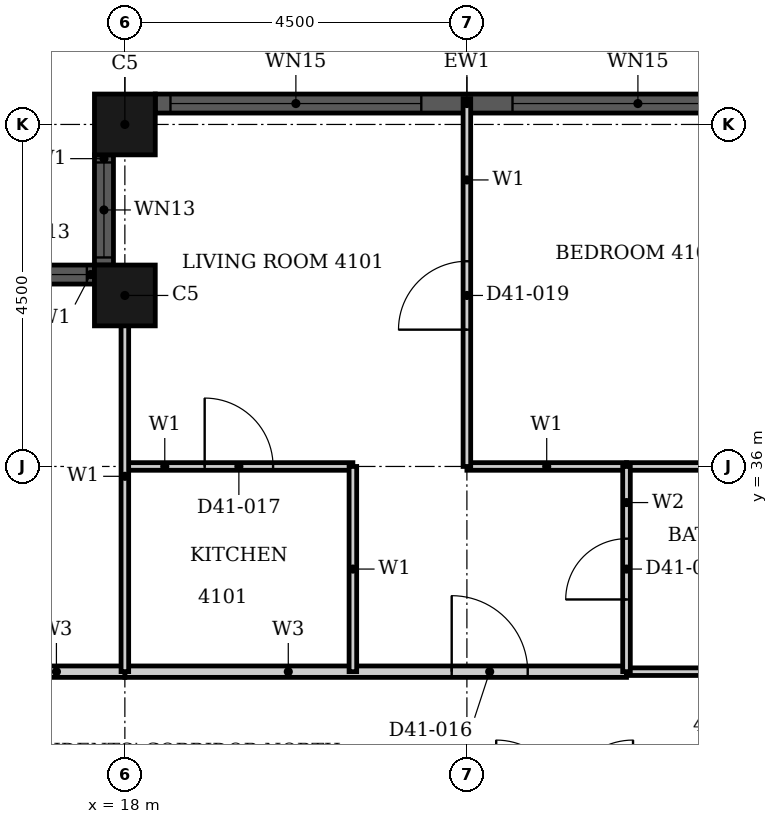
"""IFC4 building model, lengths in metres.
Left out: names, types, materials, properties, quantities, classifications, styles, units other than length and angle.
Written with IfcOpenShell. Run it as: python <this file> out.ifc"""

import sys

from ifc_helpers import new_model, si_unit, direction, frame, frame_2d, origin, origin_2d, place, context, subcontext, project, spatial, rectangle, hollow_rectangle, extrude, element, fill, save


model = new_model("IFC4")
c1 = context("Model", 3, precision=1e-05, world=origin(), true_north=direction((0.0, 1.0)))
c2 = subcontext(c1, "Body", "Model", "MODEL_VIEW")
j1 = project(units=[si_unit("LENGTHUNIT", "METRE"), si_unit("PLANEANGLEUNIT", "RADIAN")], contexts=[c1])
p1 = place(None, origin())
s1 = spatial("IfcSite", under=j1, at=p1, CompositionType="ELEMENT")
p2 = place(p1, origin())
s2 = spatial("IfcBuilding", under=s1, at=p2, CompositionType="ELEMENT")
p3 = place(p2, frame((0.0, 0.0, 165.4)))
s3 = spatial("IfcBuildingStorey", under=s2, at=p3, CompositionType="ELEMENT", Elevation=165.4)
for number, where, z_axis, x_axis in (
    (1, (18.0, 40.5, 0.0), (0.0, 0.0, 1.0), (1.0, 0.0, 0.0)),
    (2, (18.0, 38.25, 0.0), (0.0, 0.0, 1.0), (1.0, 0.0, 0.0)),
):
    element("IfcColumn", number, at=place(p3, frame(where, z_axis=z_axis, x_axis=x_axis)), inside=s3, PredefinedType="COLUMN", context=c2, shape_type="SweptSolid", body=[
        extrude(hollow_rectangle(XDim=0.8, YDim=0.8, WallThickness=0.025, at=origin_2d()), origin(), (0.0, 0.0, 1.0), 3.7),
    ])
p4 = place(p3, frame((26.6, 40.775, 0.0), z_axis=(0.0, 0.0, 1.0), x_axis=(-1.0, 0.0, 0.0)))
e3 = element("IfcWall", 3, at=p4, inside=s3, PredefinedType="SOLIDWALL", context=c2, shape_type="SweptSolid", body=[
    extrude(rectangle(XDim=8.2, YDim=0.25, at=frame_2d((4.1, 0.0))), origin(), (0.0, 0.0, 1.0), 3.7),
])
p5 = place(p4, frame((0.2, 0.0, 0.45)))
e4 = element("IfcOpeningElement", 4, at=p5, cuts=e3, PredefinedType="OPENING", context=c2, shape_type="SweptSolid", body=[
    extrude(rectangle(XDim=3.3, YDim=2.3, at=frame_2d((1.65, 1.15))), frame((0.0, 0.135, 0.0), z_axis=(0.0, -1.0, 0.0), x_axis=(1.0, 0.0, 0.0)), (0.0, 0.0, 1.0), 0.27),
])
p6 = place(p4, frame((4.7, 0.0, 0.45)))
e5 = element("IfcOpeningElement", 5, at=p6, cuts=e3, PredefinedType="OPENING", context=c2, shape_type="SweptSolid", body=[
    extrude(rectangle(XDim=3.3, YDim=2.3, at=frame_2d((1.65, 1.15))), frame((0.0, 0.135, 0.0), z_axis=(0.0, -1.0, 0.0), x_axis=(1.0, 0.0, 0.0)), (0.0, 0.0, 1.0), 0.27),
])
p7 = place(p3, frame((17.725, 40.1, 0.0), z_axis=(0.0, 0.0, 1.0), x_axis=(0.0, -1.0, 0.0)))
e6 = element("IfcWall", 6, at=p7, inside=s3, PredefinedType="SOLIDWALL", context=c2, shape_type="SweptSolid", body=[
    extrude(rectangle(XDim=1.45, YDim=0.25, at=frame_2d((0.725, 0.0))), origin(), (0.0, 0.0, 1.0), 3.7),
])
p8 = place(p7, frame((0.1, 0.0, 0.9)))
e7 = element("IfcOpeningElement", 7, at=p8, cuts=e6, PredefinedType="OPENING", context=c2, shape_type="SweptSolid", body=[
    extrude(rectangle(XDim=1.25, YDim=1.85, at=frame_2d((0.625, 0.925))), frame((0.0, 0.135, 0.0), z_axis=(0.0, -1.0, 0.0), x_axis=(1.0, 0.0, 0.0)), (0.0, 0.0, 1.0), 0.27),
])
p9 = place(p3, frame((17.6, 38.525, 0.0), z_axis=(0.0, 0.0, 1.0), x_axis=(-1.0, 0.0, 0.0)))
e8 = element("IfcWall", 8, at=p9, inside=s3, PredefinedType="SOLIDWALL", context=c2, shape_type="SweptSolid", body=[
    extrude(rectangle(XDim=1.45, YDim=0.25, at=frame_2d((0.725, 0.0))), origin(), (0.0, 0.0, 1.0), 3.7),
])
p10 = place(p9, frame((0.1, 0.0, 0.9)))
e9 = element("IfcOpeningElement", 9, at=p10, cuts=e8, PredefinedType="OPENING", context=c2, shape_type="SweptSolid", body=[
    extrude(rectangle(XDim=1.25, YDim=1.85, at=frame_2d((0.625, 0.925))), frame((0.0, 0.135, 0.0), z_axis=(0.0, -1.0, 0.0), x_axis=(1.0, 0.0, 0.0)), (0.0, 0.0, 1.0), 0.27),
])
p11 = place(p3, frame((18.0, 33.3, 0.0), z_axis=(0.0, 0.0, 1.0), x_axis=(1.0, 0.0, 0.0)))
e10 = element("IfcWall", 10, at=p11, inside=s3, PredefinedType="PARTITIONING", context=c2, shape_type="SweptSolid", body=[
    extrude(rectangle(XDim=6.6, YDim=0.15, at=frame_2d((3.3, 0.0))), origin(), (0.0, 0.0, 1.0), 3.4),
])
p12 = place(p11, frame((4.3, 0.0, 0.0)))
e11 = element("IfcOpeningElement", 11, at=p12, cuts=e10, PredefinedType="OPENING", context=c2, shape_type="SweptSolid", body=[
    extrude(rectangle(XDim=1.0, YDim=2.2, at=frame_2d((0.5, 1.1))), frame((0.0, 0.085, 0.0), z_axis=(0.0, -1.0, 0.0), x_axis=(1.0, 0.0, 0.0)), (0.0, 0.0, 1.0), 0.17),
])
p13 = place(p3, frame((16.2, 33.3, 0.0), z_axis=(0.0, 0.0, 1.0), x_axis=(1.0, 0.0, 0.0)))
e12 = element("IfcWall", 12, at=p13, inside=s3, PredefinedType="PARTITIONING", context=c2, shape_type="SweptSolid", body=[
    extrude(rectangle(XDim=1.799, YDim=0.15, at=frame_2d((0.899, 0.0))), origin(), (0.0, 0.0, 1.0), 3.4),
])
p14 = place(p3, frame((22.5, 36.0, 0.0), z_axis=(0.0, 0.0, 1.0), x_axis=(1.0, 0.0, 0.0)))
e13 = element("IfcWall", 13, at=p14, inside=s3, PredefinedType="PARTITIONING", context=c2, shape_type="SweptSolid", body=[
    extrude(rectangle(XDim=2.1, YDim=0.1, at=frame_2d((1.05, 0.0))), origin(), (0.0, 0.0, 1.0), 3.4),
])
p15 = place(p3, frame((18.0, 36.0, 0.0), z_axis=(0.0, 0.0, 1.0), x_axis=(1.0, 0.0, 0.0)))
e14 = element("IfcWall", 14, at=p15, inside=s3, PredefinedType="PARTITIONING", context=c2, shape_type="SweptSolid", body=[
    extrude(rectangle(XDim=3.0, YDim=0.1, at=frame_2d((1.5, 0.0))), origin(), (0.0, 0.0, 1.0), 3.4),
])
p16 = place(p15, frame((1.05, 0.0, 0.0)))
e15 = element("IfcOpeningElement", 15, at=p16, cuts=e14, PredefinedType="OPENING", context=c2, shape_type="SweptSolid", body=[
    extrude(rectangle(XDim=0.9, YDim=2.1, at=frame_2d((0.45, 1.05))), frame((0.0, 0.06, 0.0), z_axis=(0.0, -1.0, 0.0), x_axis=(1.0, 0.0, 0.0)), (0.0, 0.0, 1.0), 0.12),
])
p17 = place(p3, frame((18.0, 33.301, 0.0), z_axis=(0.0, 0.0, 1.0), x_axis=(0.0, 1.0, 0.0)))
e16 = element("IfcWall", 16, at=p17, inside=s3, PredefinedType="PARTITIONING", context=c2, shape_type="SweptSolid", body=[
    extrude(rectangle(XDim=5.139, YDim=0.1, at=frame_2d((2.569, 0.0))), origin(), (0.0, 0.0, 1.0), 3.4),
])
p18 = place(p3, frame((21.0, 33.3, 0.0), z_axis=(0.0, 0.0, 1.0), x_axis=(0.0, 1.0, 0.0)))
e17 = element("IfcWall", 17, at=p18, inside=s3, PredefinedType="PARTITIONING", context=c2, shape_type="SweptSolid", body=[
    extrude(rectangle(XDim=2.7, YDim=0.1, at=frame_2d((1.35, 0.0))), origin(), (0.0, 0.0, 1.0), 3.4),
])
p19 = place(p3, frame((22.5, 36.0, 0.0), z_axis=(0.0, 0.0, 1.0), x_axis=(0.0, 1.0, 0.0)))
e18 = element("IfcWall", 18, at=p19, inside=s3, PredefinedType="PARTITIONING", context=c2, shape_type="SweptSolid", body=[
    extrude(rectangle(XDim=4.84, YDim=0.1, at=frame_2d((2.42, 0.0))), origin(), (0.0, 0.0, 1.0), 3.4),
])
p20 = place(p19, frame((1.8, 0.0, 0.0)))
e19 = element("IfcOpeningElement", 19, at=p20, cuts=e18, PredefinedType="OPENING", context=c2, shape_type="SweptSolid", body=[
    extrude(rectangle(XDim=0.9, YDim=2.1, at=frame_2d((0.45, 1.05))), frame((0.0, 0.06, 0.0), z_axis=(0.0, -1.0, 0.0), x_axis=(1.0, 0.0, 0.0)), (0.0, 0.0, 1.0), 0.12),
])
for number, where, z_axis, x_axis in (
    (20, (24.6, 33.3, 0.0), (0.0, 0.0, 1.0), (1.0, 0.0, 0.0)),
    (21, (24.6, 36.0, 0.0), (0.0, 0.0, 1.0), (1.0, 0.0, 0.0)),
):
    element("IfcWall", number, at=place(p3, frame(where, z_axis=z_axis, x_axis=x_axis)), inside=s3, PredefinedType="PARTITIONING", context=c2, shape_type="SweptSolid", body=[
        extrude(rectangle(XDim=2.4, YDim=0.1, at=frame_2d((1.2, 0.0))), origin(), (0.0, 0.0, 1.0), 3.4),
    ])
p21 = place(p3, frame((24.6, 33.3, 0.0), z_axis=(0.0, 0.0, 1.0), x_axis=(0.0, 1.0, 0.0)))
e22 = element("IfcWall", 22, at=p21, inside=s3, PredefinedType="PARTITIONING", context=c2, shape_type="SweptSolid", body=[
    extrude(rectangle(XDim=2.7, YDim=0.1, at=frame_2d((1.35, 0.0))), origin(), (0.0, 0.0, 1.0), 3.4),
])
p22 = place(p21, frame((0.95, 0.0, 0.0)))
e23 = element("IfcOpeningElement", 23, at=p22, cuts=e22, PredefinedType="OPENING", context=c2, shape_type="SweptSolid", body=[
    extrude(rectangle(XDim=0.8, YDim=2.1, at=frame_2d((0.4, 1.05))), frame((0.0, 0.06, 0.0), z_axis=(0.0, -1.0, 0.0), x_axis=(1.0, 0.0, 0.0)), (0.0, 0.0, 1.0), 0.12),
])
p23 = place(p5, origin())
e24 = element("IfcWindow", 24, at=p23, inside=s3, PartitioningType="SINGLE_PANEL", PredefinedType="WINDOW", context=c2, shape_type="SweptSolid", body=[
    extrude(rectangle(XDim=3.3, YDim=2.3, at=frame_2d((1.65, 1.15))), frame((0.0, 0.03, 0.0), z_axis=(0.0, -1.0, 0.0), x_axis=(1.0, 0.0, 0.0)), (0.0, 0.0, 1.0), 0.06),
])
fill(e4, e24)
p24 = place(p6, origin())
e25 = element("IfcWindow", 25, at=p24, inside=s3, PartitioningType="SINGLE_PANEL", PredefinedType="WINDOW", context=c2, shape_type="SweptSolid", body=[
    extrude(rectangle(XDim=3.3, YDim=2.3, at=frame_2d((1.65, 1.15))), frame((0.0, 0.03, 0.0), z_axis=(0.0, -1.0, 0.0), x_axis=(1.0, 0.0, 0.0)), (0.0, 0.0, 1.0), 0.06),
])
fill(e5, e25)
p25 = place(p8, origin())
e26 = element("IfcWindow", 26, at=p25, inside=s3, PartitioningType="SINGLE_PANEL", PredefinedType="WINDOW", context=c2, shape_type="SweptSolid", body=[
    extrude(rectangle(XDim=1.25, YDim=1.85, at=frame_2d((0.625, 0.925))), frame((0.0, 0.03, 0.0), z_axis=(0.0, -1.0, 0.0), x_axis=(1.0, 0.0, 0.0)), (0.0, 0.0, 1.0), 0.06),
])
fill(e7, e26)
p26 = place(p10, origin())
e27 = element("IfcWindow", 27, at=p26, inside=s3, PartitioningType="SINGLE_PANEL", PredefinedType="WINDOW", context=c2, shape_type="SweptSolid", body=[
    extrude(rectangle(XDim=1.25, YDim=1.85, at=frame_2d((0.625, 0.925))), frame((0.0, 0.03, 0.0), z_axis=(0.0, -1.0, 0.0), x_axis=(1.0, 0.0, 0.0)), (0.0, 0.0, 1.0), 0.06),
])
fill(e9, e27)
p27 = place(p12, origin())
e28 = element("IfcDoor", 28, at=p27, inside=s3, OperationType="SINGLE_SWING_RIGHT", PredefinedType="DOOR", context=c2, shape_type="SweptSolid", body=[
    extrude(rectangle(XDim=1.0, YDim=2.2, at=frame_2d((0.5, 1.1))), frame((0.0, 0.025, 0.0), z_axis=(0.0, -1.0, 0.0), x_axis=(1.0, 0.0, 0.0)), (0.0, 0.0, 1.0), 0.05),
])
fill(e11, e28)
p28 = place(p16, origin())
e29 = element("IfcDoor", 29, at=p28, inside=s3, OperationType="SINGLE_SWING_LEFT", PredefinedType="DOOR", context=c2, shape_type="SweptSolid", body=[
    extrude(rectangle(XDim=0.9, YDim=2.1, at=frame_2d((0.45, 1.05))), frame((0.0, 0.025, 0.0), z_axis=(0.0, -1.0, 0.0), x_axis=(1.0, 0.0, 0.0)), (0.0, 0.0, 1.0), 0.05),
])
fill(e15, e29)
p29 = place(p22, origin())
e30 = element("IfcDoor", 30, at=p29, inside=s3, OperationType="SINGLE_SWING_LEFT", PredefinedType="DOOR", context=c2, shape_type="SweptSolid", body=[
    extrude(rectangle(XDim=0.8, YDim=2.1, at=frame_2d((0.4, 1.05))), frame((0.0, 0.025, 0.0), z_axis=(0.0, -1.0, 0.0), x_axis=(1.0, 0.0, 0.0)), (0.0, 0.0, 1.0), 0.05),
])
fill(e23, e30)
p30 = place(p20, origin())
e31 = element("IfcDoor", 31, at=p30, inside=s3, OperationType="SINGLE_SWING_LEFT", PredefinedType="DOOR", context=c2, shape_type="SweptSolid", body=[
    extrude(rectangle(XDim=0.9, YDim=2.1, at=frame_2d((0.45, 1.05))), frame((0.0, 0.025, 0.0), z_axis=(0.0, -1.0, 0.0), x_axis=(1.0, 0.0, 0.0)), (0.0, 0.0, 1.0), 0.05),
])
fill(e19, e31)
save(model, sys.argv[1])
